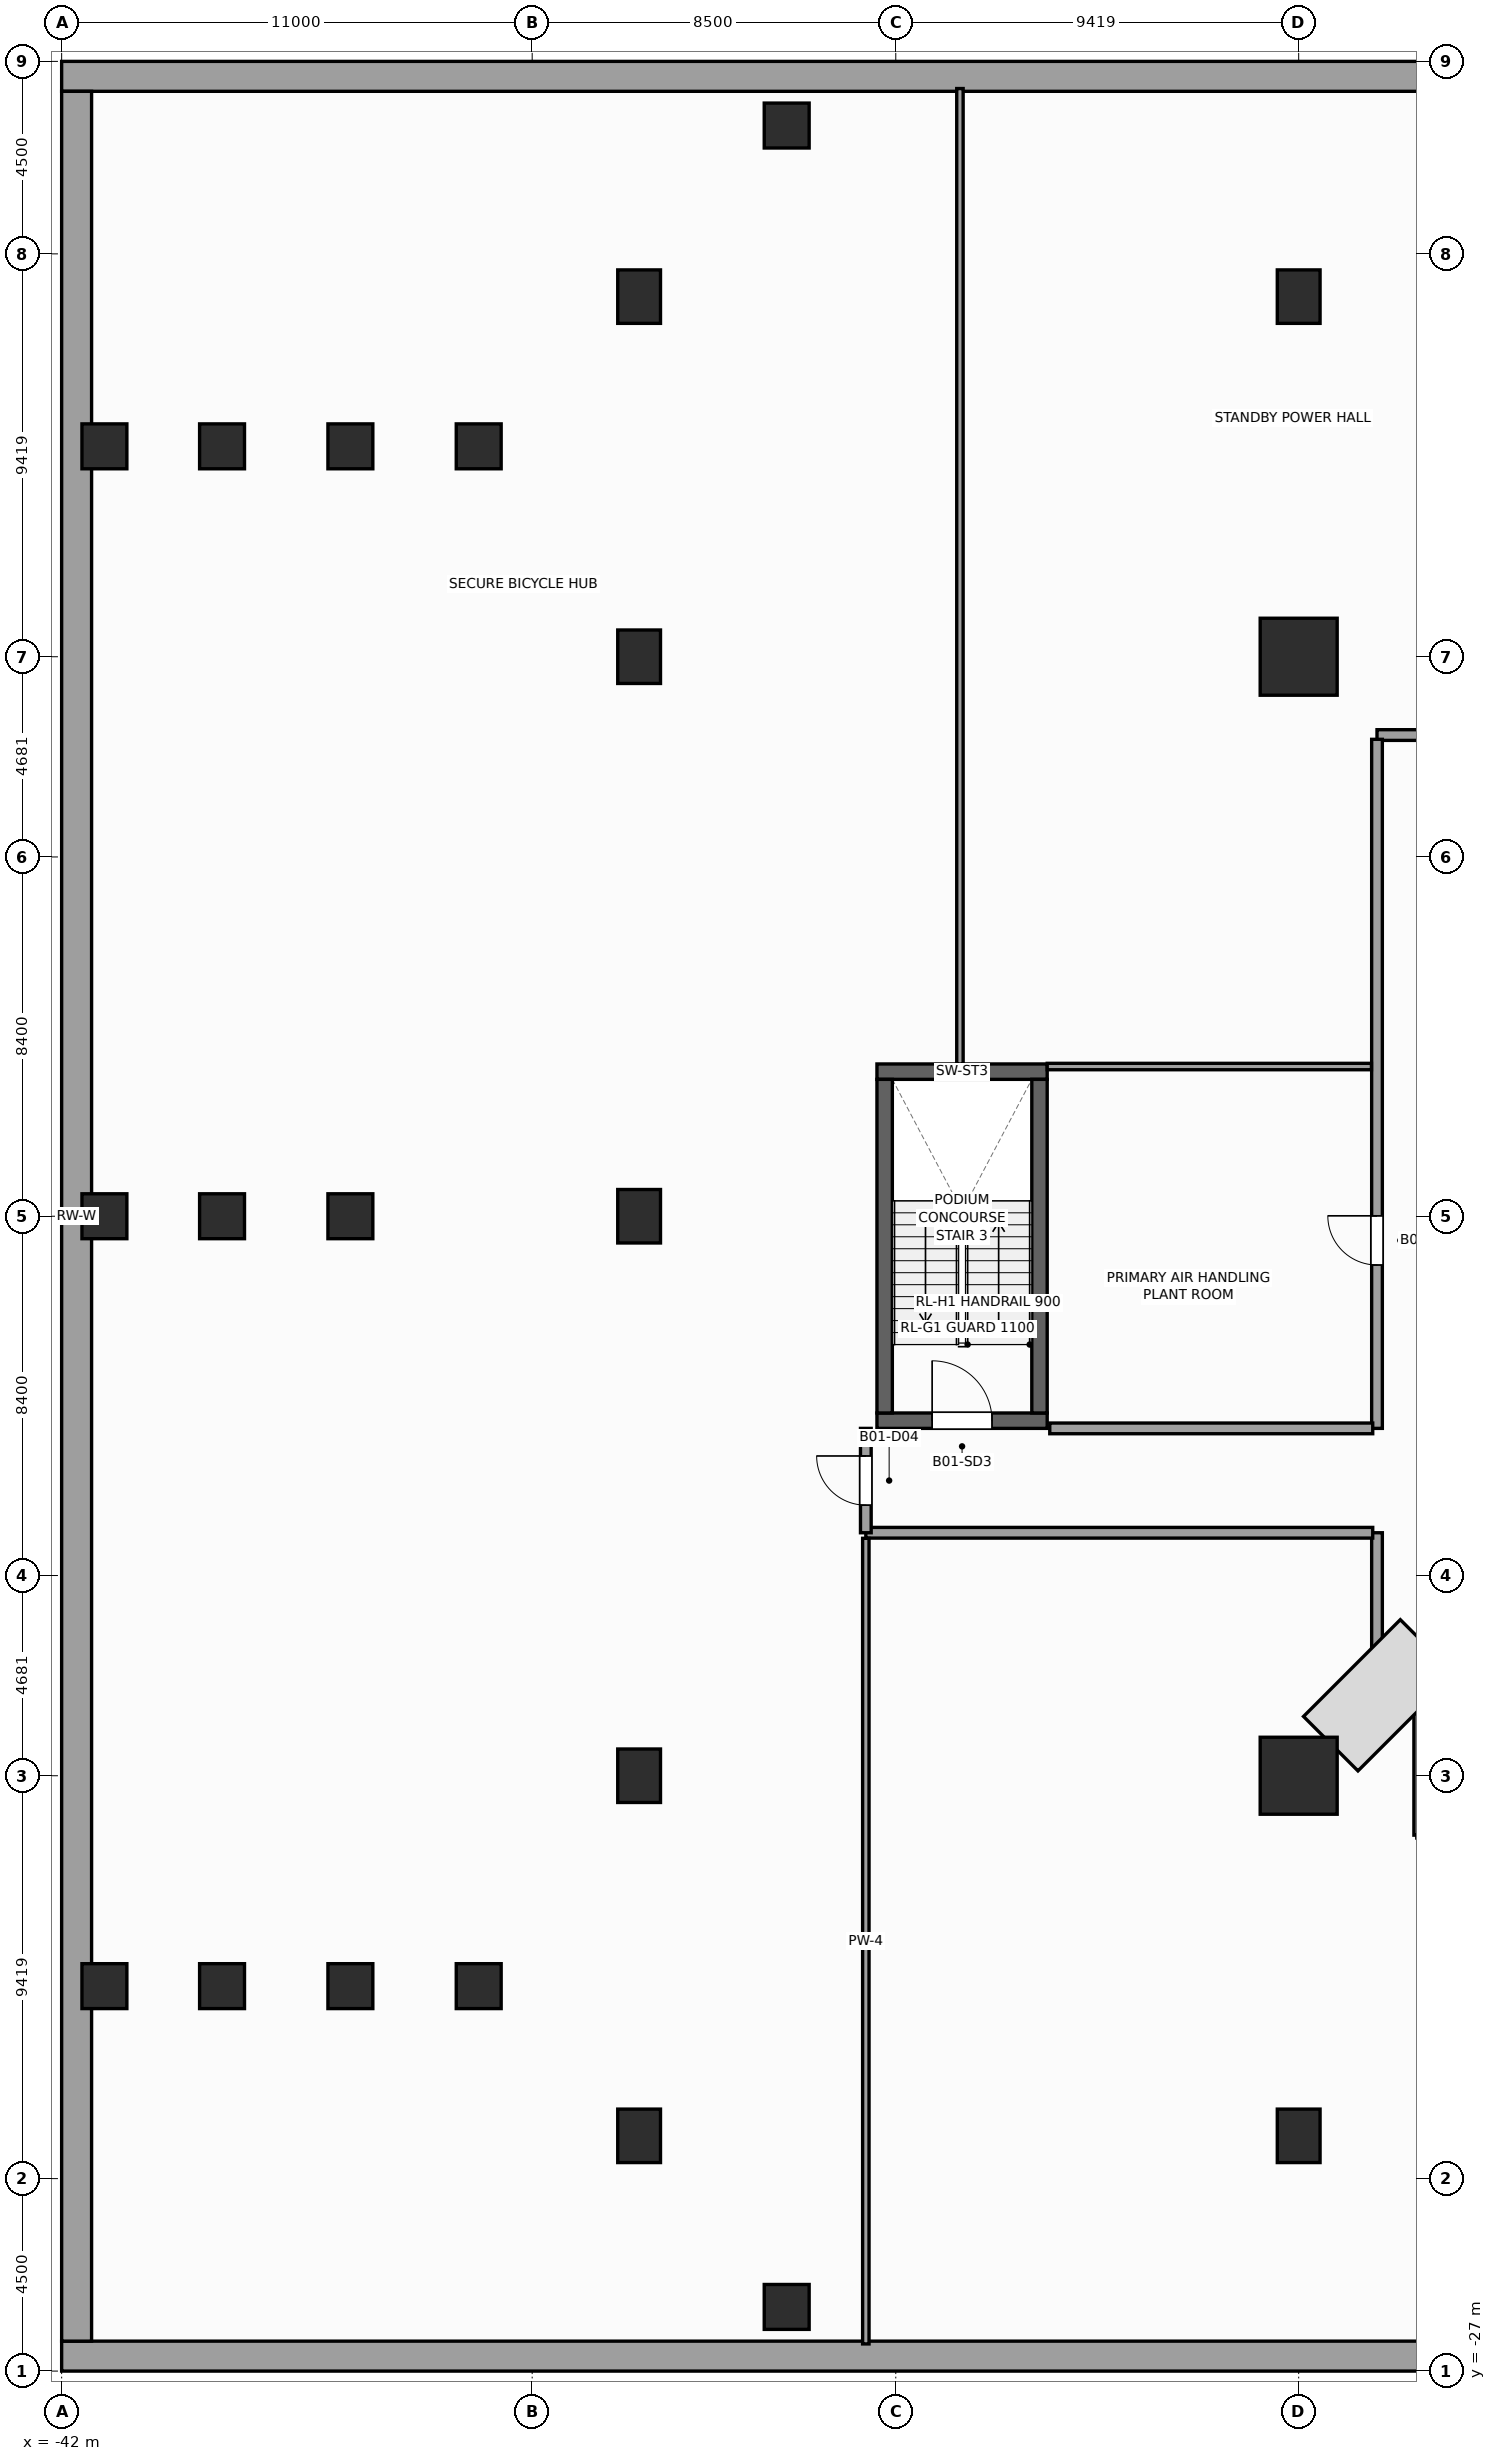
"""IFC4 building model, lengths in metres.
Left out: names, types, materials, properties, quantities, classifications, styles, units other than length and angle.
Written with IfcOpenShell. Run it as: python <this file> out.ifc"""

import sys

from ifc_helpers import new_model, si_unit, direction, frame, frame_2d, origin, origin_2d, place, context, subcontext, project, spatial, rectangle, extrude, source, transform, mapped, element, fill, save


model = new_model("IFC4")
c1 = context("Model", 3, precision=1e-05, world=origin(), true_north=direction((0.0, 1.0)))
c2 = subcontext(c1, "Body", "Model", "MODEL_VIEW")
j1 = project(units=[si_unit("LENGTHUNIT", "METRE"), si_unit("PLANEANGLEUNIT", "RADIAN")], contexts=[c1])
p1 = place(None, origin())
s1 = spatial("IfcSite", under=j1, at=p1, CompositionType="ELEMENT")
p2 = place(p1, origin())
s2 = spatial("IfcBuilding", under=s1, at=p2, CompositionType="ELEMENT")
p3 = place(p2, frame((0.0, 0.0, -4.5)))
s3 = spatial("IfcBuildingStorey", under=s2, at=p3, CompositionType="ELEMENT", Elevation=-4.5)
p4 = place(p3, frame((-22.94, -4.78, 0.0), z_axis=(0.0, 0.0, 1.0), x_axis=(1.0, 0.0, 0.0)))
e1 = element("IfcWall", 1, at=p4, inside=s3, PredefinedType="SHEAR", context=c2, shape_type="SweptSolid", body=[
    extrude(rectangle(XDim=3.98, YDim=0.36, at=frame_2d((1.99, 0.0))), origin(), (0.0, 0.0, 1.0), 4.5),
])
p5 = place(p4, frame((1.29, 0.0, 0.0)))
e2 = element("IfcOpeningElement", 2, at=p5, cuts=e1, PredefinedType="OPENING", context=c2, shape_type="SweptSolid", body=[
    extrude(rectangle(XDim=1.4, YDim=2.2, at=frame_2d((0.7, 1.1))), frame((0.0, 0.19, 0.0), z_axis=(0.0, -1.0, 0.0), x_axis=(1.0, 0.0, 0.0)), (0.0, 0.0, 1.0), 0.38),
])
p6 = place(p3, frame((-22.94, 3.38, 0.0), z_axis=(0.0, 0.0, 1.0), x_axis=(1.0, 0.0, 0.0)))
e3 = element("IfcWall", 3, at=p6, inside=s3, PredefinedType="SHEAR", context=c2, shape_type="SweptSolid", body=[
    extrude(rectangle(XDim=3.98, YDim=0.36, at=frame_2d((1.99, 0.0))), origin(), (0.0, 0.0, 1.0), 4.5),
])
for number, where, z_axis, x_axis in (
    (4, (-22.76, -4.6, 0.0), (0.0, 0.0, 1.0), (0.0, 1.0, 0.0)),
    (5, (-19.14, -4.6, 0.0), (0.0, 0.0, 1.0), (0.0, 1.0, 0.0)),
):
    element("IfcWall", number, at=place(p3, frame(where, z_axis=z_axis, x_axis=x_axis)), inside=s3, PredefinedType="SHEAR", context=c2, shape_type="SweptSolid", body=[
        extrude(rectangle(XDim=7.8, YDim=0.36, at=frame_2d((3.9, 0.0))), origin(), (0.0, 0.0, 1.0), 4.5),
    ])
for number, where, z_axis, x_axis in (
    (6, (-42.0, -26.65, 0.0), (0.0, 0.0, 1.0), (1.0, 0.0, 0.0)),
    (7, (-42.0, 26.65, 0.0), (0.0, 0.0, 1.0), (1.0, 0.0, 0.0)),
):
    element("IfcWall", number, at=place(p3, frame(where, z_axis=z_axis, x_axis=x_axis)), inside=s3, PredefinedType="USERDEFINED", context=c2, shape_type="SweptSolid", body=[
        extrude(rectangle(XDim=84.0, YDim=0.7, at=frame_2d((42.0, 0.0))), origin(), (0.0, 0.0, 1.0), 4.5),
    ])
p7 = place(p3, frame((-41.65, -26.3, 0.0), z_axis=(0.0, 0.0, 1.0), x_axis=(0.0, 1.0, 0.0)))
e8 = element("IfcWall", 8, at=p7, inside=s3, PredefinedType="USERDEFINED", context=c2, shape_type="SweptSolid", body=[
    extrude(rectangle(XDim=52.6, YDim=0.7, at=frame_2d((26.3, 0.0))), origin(), (0.0, 0.0, 1.0), 4.5),
])
m1 = source(origin(), c2, "Body", "SweptSolid", [
    extrude(rectangle(XDim=1.8, YDim=1.8, at=origin_2d()), origin(), (0.0, 0.0, 1.0), 4.5),
])
for number, where, z_axis, x_axis in (
    (9, (-13.081, -13.081, 0.0), (0.0, 0.0, 1.0), (1.0, 0.0, 0.0)),
    (10, (-13.081, 13.081, 0.0), (0.0, 0.0, 1.0), (1.0, 0.0, 0.0)),
):
    element("IfcColumn", number, at=place(p3, frame(where, z_axis=z_axis, x_axis=x_axis)), inside=s3, PredefinedType="COLUMN", context=c2, shape_type="MappedRepresentation", body=[
        mapped(m1, transform((0.0, 0.0, 0.0), scale=1.0)),
    ])
m2 = source(origin(), c2, "Body", "SweptSolid", [
    extrude(rectangle(XDim=1.0, YDim=1.25, at=origin_2d()), origin(), (0.0, 0.0, 1.0), 4.5),
])
for number, where, z_axis, x_axis in (
    (11, (-28.5, -21.5, 0.0), (0.0, 0.0, 1.0), (1.0, 0.0, 0.0)),
    (12, (-13.081, -21.5, 0.0), (0.0, 0.0, 1.0), (1.0, 0.0, 0.0)),
    (13, (-28.5, 21.5, 0.0), (0.0, 0.0, 1.0), (1.0, 0.0, 0.0)),
    (14, (-13.081, 21.5, 0.0), (0.0, 0.0, 1.0), (1.0, 0.0, 0.0)),
    (15, (-28.5, -13.081, 0.0), (0.0, 0.0, 1.0), (1.0, 0.0, 0.0)),
    (16, (-28.5, 0.0, 0.0), (0.0, 0.0, 1.0), (1.0, 0.0, 0.0)),
    (17, (-28.5, 13.081, 0.0), (0.0, 0.0, 1.0), (1.0, 0.0, 0.0)),
):
    element("IfcColumn", number, at=place(p3, frame(where, z_axis=z_axis, x_axis=x_axis)), inside=s3, PredefinedType="COLUMN", context=c2, shape_type="MappedRepresentation", body=[
        mapped(m2, transform((0.0, 0.0, 0.0), scale=1.0)),
    ])
m3 = source(origin(), c2, "Body", "SweptSolid", [
    extrude(rectangle(XDim=1.05, YDim=1.05, at=origin_2d()), origin(), (0.0, 0.0, 1.0), 4.5),
])
for number, where, z_axis, x_axis in (
    (18, (-25.05, -25.5, 0.0), (0.0, 0.0, 1.0), (1.0, 0.0, 0.0)),
    (19, (-25.05, 25.5, 0.0), (0.0, 0.0, 1.0), (1.0, 0.0, 0.0)),
    (20, (-32.25, -18.0, 0.0), (0.0, 0.0, 1.0), (1.0, 0.0, 0.0)),
    (21, (-32.25, 18.0, 0.0), (0.0, 0.0, 1.0), (1.0, 0.0, 0.0)),
    (22, (-35.25, -18.0, 0.0), (0.0, 0.0, 1.0), (1.0, 0.0, 0.0)),
    (23, (-35.25, 0.0, 0.0), (0.0, 0.0, 1.0), (1.0, 0.0, 0.0)),
    (24, (-35.25, 18.0, 0.0), (0.0, 0.0, 1.0), (1.0, 0.0, 0.0)),
    (25, (-38.25, -18.0, 0.0), (0.0, 0.0, 1.0), (1.0, 0.0, 0.0)),
    (26, (-38.25, 0.0, 0.0), (0.0, 0.0, 1.0), (1.0, 0.0, 0.0)),
    (27, (-38.25, 18.0, 0.0), (0.0, 0.0, 1.0), (1.0, 0.0, 0.0)),
    (28, (-41.0, -18.0, 0.0), (0.0, 0.0, 1.0), (1.0, 0.0, 0.0)),
    (29, (-41.0, 0.0, 0.0), (0.0, 0.0, 1.0), (1.0, 0.0, 0.0)),
    (30, (-41.0, 18.0, 0.0), (0.0, 0.0, 1.0), (1.0, 0.0, 0.0)),
):
    element("IfcColumn", number, at=place(p3, frame(where, z_axis=z_axis, x_axis=x_axis)), inside=s3, PredefinedType="COLUMN", context=c2, shape_type="MappedRepresentation", body=[
        mapped(m3, transform((0.0, 0.0, 0.0), scale=1.0)),
    ])
p8 = place(p3, frame((-11.25, -11.25, 0.0), z_axis=(0.0, 0.0, 1.0), x_axis=(1.0, 0.0, 0.0)))
e31 = element("IfcWall", 31, at=p8, inside=s3, PredefinedType="PARTITIONING", context=c2, shape_type="SweptSolid", body=[
    extrude(rectangle(XDim=22.5, YDim=0.25, at=frame_2d((11.25, 0.0))), origin(), (0.0, 0.0, 1.0), 4.1),
])
p9 = place(p8, frame((1.605, 0.0, 0.0)))
e32 = element("IfcOpeningElement", 32, at=p9, cuts=e31, PredefinedType="OPENING", context=c2, shape_type="SweptSolid", body=[
    extrude(rectangle(XDim=0.95, YDim=2.1, at=frame_2d((0.475, 1.05))), frame((0.0, 0.135, 0.0), z_axis=(0.0, -1.0, 0.0), x_axis=(1.0, 0.0, 0.0)), (0.0, 0.0, 1.0), 0.27),
])
p10 = place(p8, frame((12.12, 0.0, 0.0)))
e33 = element("IfcOpeningElement", 33, at=p10, cuts=e31, PredefinedType="OPENING", context=c2, shape_type="SweptSolid", body=[
    extrude(rectangle(XDim=1.15, YDim=2.25, at=frame_2d((0.575, 1.125))), frame((0.0, 0.135, 0.0), z_axis=(0.0, -1.0, 0.0), x_axis=(1.0, 0.0, 0.0)), (0.0, 0.0, 1.0), 0.27),
])
p11 = place(p3, frame((-11.25, 11.25, 0.0), z_axis=(0.0, 0.0, 1.0), x_axis=(1.0, 0.0, 0.0)))
e34 = element("IfcWall", 34, at=p11, inside=s3, PredefinedType="PARTITIONING", context=c2, shape_type="SweptSolid", body=[
    extrude(rectangle(XDim=22.5, YDim=0.25, at=frame_2d((11.25, 0.0))), origin(), (0.0, 0.0, 1.0), 4.1),
])
p12 = place(p11, frame((10.675, 0.0, 0.0)))
e35 = element("IfcOpeningElement", 35, at=p12, cuts=e34, PredefinedType="OPENING", context=c2, shape_type="SweptSolid", body=[
    extrude(rectangle(XDim=1.15, YDim=2.25, at=frame_2d((0.575, 1.125))), frame((0.0, 0.135, 0.0), z_axis=(0.0, -1.0, 0.0), x_axis=(1.0, 0.0, 0.0)), (0.0, 0.0, 1.0), 0.27),
])
p13 = place(p3, frame((-11.25, -11.15, 0.0), z_axis=(0.0, 0.0, 1.0), x_axis=(0.0, 1.0, 0.0)))
e36 = element("IfcWall", 36, at=p13, inside=s3, PredefinedType="PARTITIONING", context=c2, shape_type="SweptSolid", body=[
    extrude(rectangle(XDim=3.75, YDim=0.25, at=frame_2d((1.875, 0.0))), origin(), (0.0, 0.0, 1.0), 4.1),
])
p14 = place(p3, frame((-11.25, -4.96, 0.0), z_axis=(0.0, 0.0, 1.0), x_axis=(0.0, 1.0, 0.0)))
e37 = element("IfcWall", 37, at=p14, inside=s3, PredefinedType="PARTITIONING", context=c2, shape_type="SweptSolid", body=[
    extrude(rectangle(XDim=16.11, YDim=0.25, at=frame_2d((8.055, 0.0))), origin(), (0.0, 0.0, 1.0), 4.1),
])
p15 = place(p14, frame((3.82, 0.0, 0.0)))
e38 = element("IfcOpeningElement", 38, at=p15, cuts=e37, PredefinedType="OPENING", context=c2, shape_type="SweptSolid", body=[
    extrude(rectangle(XDim=1.15, YDim=2.25, at=frame_2d((0.575, 1.125))), frame((0.0, 0.135, 0.0), z_axis=(0.0, -1.0, 0.0), x_axis=(1.0, 0.0, 0.0)), (0.0, 0.0, 1.0), 0.27),
])
p16 = place(p3, frame((-23.2, -7.4, 0.0), z_axis=(0.0, 0.0, 1.0), x_axis=(1.0, 0.0, 0.0)))
e39 = element("IfcWall", 39, at=p16, inside=s3, PredefinedType="PARTITIONING", context=c2, shape_type="SweptSolid", body=[
    extrude(rectangle(XDim=11.85, YDim=0.25, at=frame_2d((5.925, 0.0))), origin(), (0.0, 0.0, 1.0), 4.1),
])
p17 = place(p3, frame((-18.9, -4.96, 0.0), z_axis=(0.0, 0.0, 1.0), x_axis=(1.0, 0.0, 0.0)))
e40 = element("IfcWall", 40, at=p17, inside=s3, PredefinedType="PARTITIONING", context=c2, shape_type="SweptSolid", body=[
    extrude(rectangle(XDim=7.55, YDim=0.25, at=frame_2d((3.775, 0.0))), origin(), (0.0, 0.0, 1.0), 4.1),
])
p18 = place(p3, frame((-23.2, -7.4, 0.0), z_axis=(0.0, 0.0, 1.0), x_axis=(0.0, 1.0, 0.0)))
e41 = element("IfcWall", 41, at=p18, inside=s3, PredefinedType="PARTITIONING", context=c2, shape_type="SweptSolid", body=[
    extrude(rectangle(XDim=2.44, YDim=0.25, at=frame_2d((1.22, 0.0))), origin(), (0.0, 0.0, 1.0), 4.1),
])
p19 = place(p18, frame((0.645, 0.0, 0.0)))
e42 = element("IfcOpeningElement", 42, at=p19, cuts=e41, PredefinedType="OPENING", context=c2, shape_type="SweptSolid", body=[
    extrude(rectangle(XDim=1.15, YDim=2.25, at=frame_2d((0.575, 1.125))), frame((0.0, 0.135, 0.0), z_axis=(0.0, -1.0, 0.0), x_axis=(1.0, 0.0, 0.0)), (0.0, 0.0, 1.0), 0.27),
])
p20 = place(p3, frame((-23.2, -26.365, 0.0), z_axis=(0.0, 0.0, 1.0), x_axis=(0.0, 1.0, 0.0)))
e43 = element("IfcWall", 43, at=p20, inside=s3, PredefinedType="PARTITIONING", context=c2, shape_type="SweptSolid", body=[
    extrude(rectangle(XDim=18.835, YDim=0.15, at=frame_2d((9.417, 0.0))), origin(), (0.0, 0.0, 1.0), 4.1),
])
p21 = place(p3, frame((-21.0, 3.56, 0.0), z_axis=(0.0, 0.0, 1.0), x_axis=(0.0, 1.0, 0.0)))
e44 = element("IfcWall", 44, at=p21, inside=s3, PredefinedType="PARTITIONING", context=c2, shape_type="SweptSolid", body=[
    extrude(rectangle(XDim=22.805, YDim=0.15, at=frame_2d((11.402, 0.0))), origin(), (0.0, 0.0, 1.0), 4.1),
])
p22 = place(p3, frame((-18.96, 3.5, 0.0), z_axis=(0.0, 0.0, 1.0), x_axis=(1.0, 0.0, 0.0)))
e45 = element("IfcWall", 45, at=p22, inside=s3, PredefinedType="PARTITIONING", context=c2, shape_type="SweptSolid", body=[
    extrude(rectangle(XDim=7.58, YDim=0.15, at=frame_2d((3.79, 0.0))), origin(), (0.0, 0.0, 1.0), 4.1),
])
p23 = place(p3, frame((-10.32, -14.47, 0.0), z_axis=(0.0, 0.0, 1.0), x_axis=(0.0, 1.0, 0.0)))
e46 = element("IfcWall", 46, at=p23, inside=s3, PredefinedType="PARTITIONING", context=c2, shape_type="SweptSolid", body=[
    extrude(rectangle(XDim=3.2, YDim=0.135, at=frame_2d((1.6, 0.0))), origin(), (0.0, 0.0, 1.0), 4.1),
])
m4 = source(origin(), c2, "Body", "SweptSolid", [
    extrude(rectangle(XDim=1.4, YDim=2.2, at=frame_2d((0.7, 1.1))), frame((0.0, 0.025, 0.0), z_axis=(0.0, -1.0, 0.0), x_axis=(1.0, 0.0, 0.0)), (0.0, 0.0, 1.0), 0.05),
])
p24 = place(p5, origin())
e47 = element("IfcDoor", 47, at=p24, inside=s3, OperationType="SINGLE_SWING_LEFT", PredefinedType="DOOR", context=c2, shape_type="MappedRepresentation", body=[
    mapped(m4, transform((0.0, 0.0, 0.0), scale=1.0)),
])
fill(e2, e47)
m5 = source(origin(), c2, "Body", "SweptSolid", [
    extrude(rectangle(XDim=1.15, YDim=2.25, at=frame_2d((0.575, 1.125))), frame((0.0, 0.025, 0.0), z_axis=(0.0, -1.0, 0.0), x_axis=(1.0, 0.0, 0.0)), (0.0, 0.0, 1.0), 0.05),
])
p25 = place(p19, origin())
e48 = element("IfcDoor", 48, at=p25, inside=s3, OperationType="SINGLE_SWING_RIGHT", PredefinedType="DOOR", context=c2, shape_type="MappedRepresentation", body=[
    mapped(m5, transform((0.0, 0.0, 0.0), scale=1.0)),
])
fill(e42, e48)
p26 = place(p15, origin())
e49 = element("IfcDoor", 49, at=p26, inside=s3, OperationType="SINGLE_SWING_RIGHT", PredefinedType="DOOR", context=c2, shape_type="MappedRepresentation", body=[
    mapped(m5, transform((0.0, 0.0, 0.0), scale=1.0)),
])
fill(e38, e49)
save(model, sys.argv[1])
